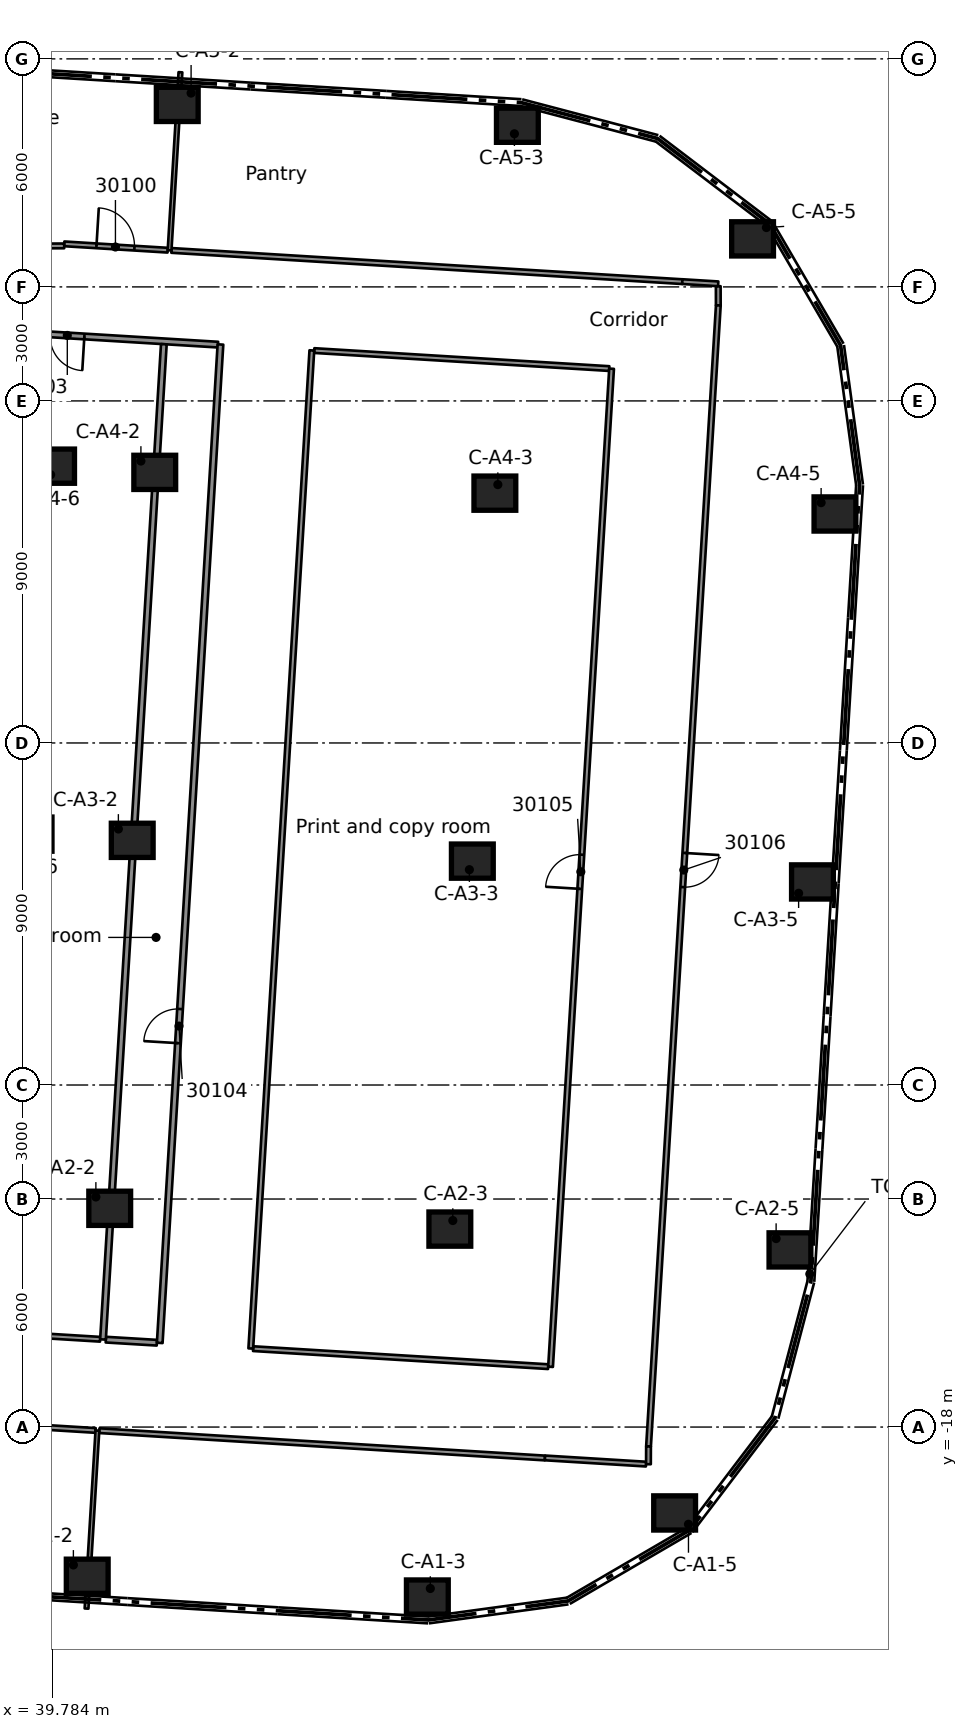
"""IFC4 building model, lengths in metres.
Left out: names, types, materials, properties, quantities, classifications, styles, units other than length and angle.
Written with IfcOpenShell. Run it as: python <this file> out.ifc"""

import sys

from ifc_helpers import new_model, si_unit, direction, frame, frame_2d, origin, origin_2d, place, context, subcontext, project, spatial, rectangle, extrude, element, fill, save


model = new_model("IFC4")
c1 = context("Model", 3, precision=1e-05, world=origin(), true_north=direction((0.0, 1.0)))
c2 = subcontext(c1, "Body", "Model", "MODEL_VIEW")
j1 = project(units=[si_unit("LENGTHUNIT", "METRE"), si_unit("PLANEANGLEUNIT", "RADIAN")], contexts=[c1])
p1 = place(None, origin())
s1 = spatial("IfcSite", under=j1, at=p1, CompositionType="ELEMENT")
p2 = place(p1, origin())
s2 = spatial("IfcBuilding", under=s1, at=p2, CompositionType="ELEMENT")
p3 = place(p2, frame((0.0, 0.0, 152.6)))
s3 = spatial("IfcBuildingStorey", under=s2, at=p3, CompositionType="ELEMENT", Elevation=152.6)
for number, where, z_axis, x_axis in (
    (1, (40.704, -21.926, 0.0), (0.0, 0.0, 1.0), (1.0, 0.0, 0.0)),
    (2, (49.654, -22.473, 0.0), (0.0, 0.0, 1.0), (1.0, 0.0, 0.0)),
    (3, (56.161, -20.26, 0.0), (0.0, 0.0, 1.0), (1.0, 0.0, 0.0)),
    (4, (41.296, -12.244, 0.0), (0.0, 0.0, 1.0), (1.0, 0.0, 0.0)),
    (5, (50.246, -12.791, 0.0), (0.0, 0.0, 1.0), (1.0, 0.0, 0.0)),
    (6, (59.196, -13.339, 0.0), (0.0, 0.0, 1.0), (1.0, 0.0, 0.0)),
    (7, (41.888, -2.562, 0.0), (0.0, 0.0, 1.0), (1.0, 0.0, 0.0)),
    (8, (50.838, -3.109, 0.0), (0.0, 0.0, 1.0), (1.0, 0.0, 0.0)),
    (9, (59.788, -3.657, 0.0), (0.0, 0.0, 1.0), (1.0, 0.0, 0.0)),
    (10, (42.481, 7.12, 0.0), (0.0, 0.0, 1.0), (1.0, 0.0, 0.0)),
    (11, (51.431, 6.573, 0.0), (0.0, 0.0, 1.0), (1.0, 0.0, 0.0)),
    (12, (60.38, 6.025, 0.0), (0.0, 0.0, 1.0), (1.0, 0.0, 0.0)),
    (13, (39.819, 7.283, 0.0), (0.0, 0.0, 1.0), (1.0, 0.0, 0.0)),
    (14, (43.073, 16.802, 0.0), (0.0, 0.0, 1.0), (1.0, 0.0, 0.0)),
    (15, (52.023, 16.254, 0.0), (0.0, 0.0, 1.0), (1.0, 0.0, 0.0)),
    (16, (58.212, 13.264, 0.0), (0.0, 0.0, 1.0), (1.0, 0.0, 0.0)),
):
    element("IfcColumn", number, at=place(p3, frame(where, z_axis=z_axis, x_axis=x_axis)), inside=s3, PredefinedType="COLUMN", context=c2, shape_type="SweptSolid", body=[
        extrude(rectangle(XDim=1.1, YDim=0.9, at=origin_2d()), origin(), (0.0, 0.0, 1.0), 3.5),
    ])
p4 = place(p3, frame((57.309, 12.018, 0.0), z_axis=(0.0, 0.0, 1.0), x_axis=(0.001937042371, -0.999998123932, 0.0)))
e17 = element("IfcWall", 17, at=p4, inside=s3, PredefinedType="PARTITIONING", context=c2, shape_type="SweptSolid", body=[
    extrude(rectangle(XDim=0.504, YDim=0.125, at=frame_2d((0.252, 0.0))), origin(), (0.0, 0.0, 1.0), 3.08),
])
p5 = place(p3, frame((41.022, -18.095, 0.0), z_axis=(0.0, 0.0, 1.0), x_axis=(0.998124844779, -0.06121106301, 0.0)))
e18 = element("IfcWall", 18, at=p5, inside=s3, PredefinedType="PARTITIONING", context=c2, shape_type="SweptSolid", body=[
    extrude(rectangle(XDim=11.746, YDim=0.125, at=frame_2d((5.873, 0.0))), origin(), (0.0, 0.0, 1.0), 3.08),
])
p6 = place(p3, frame((52.75, -18.812, 0.0), z_axis=(0.0, 0.0, 1.0), x_axis=(0.998124296611, -0.061220000931, 0.0)))
e19 = element("IfcWall", 19, at=p6, inside=s3, PredefinedType="PARTITIONING", context=c2, shape_type="SweptSolid", body=[
    extrude(rectangle(XDim=2.664, YDim=0.125, at=frame_2d((1.332, 0.0))), origin(), (0.0, 0.0, 1.0), 3.08),
])
p7 = place(p3, frame((40.923, -18.089, 0.0), z_axis=(0.0, 0.0, 1.0), x_axis=(-0.998135704692, 0.06103372034, 0.0)))
e20 = element("IfcWall", 20, at=p7, inside=s3, PredefinedType="PARTITIONING", context=c2, shape_type="SweptSolid", body=[
    extrude(rectangle(XDim=10.208, YDim=0.125, at=frame_2d((5.104, 0.0))), origin(), (0.0, 0.0, 1.0), 3.08),
])
p8 = place(p7, frame((7.938, 0.0, 0.0)))
e21 = element("IfcOpeningElement", 21, at=p8, cuts=e20, PredefinedType="OPENING", context=c2, shape_type="SweptSolid", body=[
    extrude(rectangle(XDim=0.9, YDim=2.1, at=frame_2d((0.45, 1.05))), frame((0.0, 0.073, 0.0), z_axis=(0.0, -1.0, 0.0), x_axis=(1.0, 0.0, 0.0)), (0.0, 0.0, 1.0), 0.145),
])
p9 = place(p3, frame((41.194, -15.7, 0.0), z_axis=(0.0, 0.0, 1.0), x_axis=(0.998183738246, -0.060243046918, 0.0)))
e22 = element("IfcWall", 22, at=p9, inside=s3, PredefinedType="PARTITIONING", context=c2, shape_type="SweptSolid", body=[
    extrude(rectangle(XDim=1.345, YDim=0.15, at=frame_2d((0.673, 0.0))), origin(), (0.0, 0.0, 1.0), 3.08),
])
p10 = place(p3, frame((31.07, -15.081, 0.0), z_axis=(0.0, 0.0, 1.0), x_axis=(0.998141754277, -0.060934705778, 0.0)))
e23 = element("IfcWall", 23, at=p10, inside=s3, PredefinedType="PARTITIONING", context=c2, shape_type="SweptSolid", body=[
    extrude(rectangle(XDim=9.992, YDim=0.125, at=frame_2d((4.996, 0.0))), origin(), (0.0, 0.0, 1.0), 3.08),
])
p11 = place(p10, frame((2.1, 0.0, 0.0)))
e24 = element("IfcOpeningElement", 24, at=p11, cuts=e23, PredefinedType="OPENING", context=c2, shape_type="SweptSolid", body=[
    extrude(rectangle(XDim=0.9, YDim=2.1, at=frame_2d((0.45, 1.05))), frame((0.0, 0.073, 0.0), z_axis=(0.0, -1.0, 0.0), x_axis=(1.0, 0.0, 0.0)), (0.0, 0.0, 1.0), 0.145),
])
p12 = place(p3, frame((45.07, -15.937, 0.0), z_axis=(0.0, 0.0, 1.0), x_axis=(0.998142502844, -0.060922442628, 0.0)))
e25 = element("IfcWall", 25, at=p12, inside=s3, PredefinedType="PARTITIONING", context=c2, shape_type="SweptSolid", body=[
    extrude(rectangle(XDim=7.778, YDim=0.125, at=frame_2d((3.889, 0.0))), origin(), (0.0, 0.0, 1.0), 3.08),
])
p13 = place(p3, frame((44.145, 10.481, 0.0), z_axis=(0.0, 0.0, 1.0), x_axis=(-0.998138667877, 0.06098524157, 0.0)))
e26 = element("IfcWall", 26, at=p13, inside=s3, PredefinedType="PARTITIONING", context=c2, shape_type="SweptSolid", body=[
    extrude(rectangle(XDim=11.413, YDim=0.15, at=frame_2d((5.707, 0.0))), origin(), (0.0, 0.0, 1.0), 3.08),
])
p14 = place(p13, frame((8.558, 0.0, 0.0)))
e27 = element("IfcOpeningElement", 27, at=p14, cuts=e26, PredefinedType="OPENING", context=c2, shape_type="SweptSolid", body=[
    extrude(rectangle(XDim=0.9, YDim=2.1, at=frame_2d((0.45, 1.05))), frame((0.0, 0.085, 0.0), z_axis=(0.0, -1.0, 0.0), x_axis=(1.0, 0.0, 0.0)), (0.0, 0.0, 1.0), 0.17),
])
p15 = place(p13, frame((3.523, 0.0, 0.0)))
e28 = element("IfcOpeningElement", 28, at=p15, cuts=e26, PredefinedType="OPENING", context=c2, shape_type="SweptSolid", body=[
    extrude(rectangle(XDim=0.9, YDim=2.1, at=frame_2d((0.45, 1.05))), frame((0.0, 0.085, 0.0), z_axis=(0.0, -1.0, 0.0), x_axis=(1.0, 0.0, 0.0)), (0.0, 0.0, 1.0), 0.17),
])
p16 = place(p3, frame((46.677, 10.325, 0.0), z_axis=(0.0, 0.0, 1.0), x_axis=(0.998142036778, -0.060930078101, 0.0)))
e29 = element("IfcWall", 29, at=p16, inside=s3, PredefinedType="PARTITIONING", context=c2, shape_type="SweptSolid", body=[
    extrude(rectangle(XDim=7.777, YDim=0.125, at=frame_2d((3.889, 0.0))), origin(), (0.0, 0.0, 1.0), 3.08),
])
p17 = place(p3, frame((42.921, 12.96, 0.0), z_axis=(0.0, 0.0, 1.0), x_axis=(0.998135679052, -0.061034139647, 0.0)))
e30 = element("IfcWall", 30, at=p17, inside=s3, PredefinedType="PARTITIONING", context=c2, shape_type="SweptSolid", body=[
    extrude(rectangle(XDim=13.468, YDim=0.125, at=frame_2d((6.734, 0.0))), origin(), (0.0, 0.0, 1.0), 3.08),
])
p18 = place(p3, frame((40.099, 13.133, 0.0), z_axis=(0.0, 0.0, 1.0), x_axis=(0.998123336101, -0.061235658973, 0.0)))
e31 = element("IfcWall", 31, at=p18, inside=s3, PredefinedType="PARTITIONING", context=c2, shape_type="SweptSolid", body=[
    extrude(rectangle(XDim=2.727, YDim=0.125, at=frame_2d((1.364, 0.0))), origin(), (0.0, 0.0, 1.0), 3.08),
])
p19 = place(p18, frame((0.85, 0.0, 0.0)))
e32 = element("IfcOpeningElement", 32, at=p19, cuts=e31, PredefinedType="OPENING", context=c2, shape_type="SweptSolid", body=[
    extrude(rectangle(XDim=1.0, YDim=2.1, at=frame_2d((0.5, 1.05))), frame((0.0, 0.073, 0.0), z_axis=(0.0, -1.0, 0.0), x_axis=(1.0, 0.0, 0.0)), (0.0, 0.0, 1.0), 0.145),
])
p20 = place(p3, frame((56.362, 12.139, 0.0), z_axis=(0.0, 0.0, 1.0), x_axis=(0.998134879302, -0.061047217134, 0.0)))
e33 = element("IfcWall", 33, at=p20, inside=s3, PredefinedType="PARTITIONING", context=c2, shape_type="SweptSolid", body=[
    extrude(rectangle(XDim=0.948, YDim=0.125, at=frame_2d((0.474, 0.0))), origin(), (0.0, 0.0, 1.0), 3.08),
])
p21 = place(p3, frame((31.471, 13.041, 0.0), z_axis=(0.0, 0.0, 1.0), x_axis=(0.999990255084, 0.004414718129, 0.0)))
e34 = element("IfcWall", 34, at=p21, inside=s3, PredefinedType="PARTITIONING", context=c2, shape_type="SweptSolid", body=[
    extrude(rectangle(XDim=8.627, YDim=0.125, at=frame_2d((4.313, 0.0))), origin(), (0.0, 0.0, 1.0), 3.08),
])
p22 = place(p3, frame((57.311, 11.514, 0.0), z_axis=(0.0, 0.0, 1.0), x_axis=(-0.061067487699, -0.998133639322, 0.0)))
e35 = element("IfcWall", 35, at=p22, inside=s3, PredefinedType="PARTITIONING", context=c2, shape_type="SweptSolid", body=[
    extrude(rectangle(XDim=30.08, YDim=0.125, at=frame_2d((15.04, 0.0))), origin(), (0.0, 0.0, 1.0), 3.08),
])
p23 = place(p22, frame((14.435, 0.0, 0.0)))
e36 = element("IfcOpeningElement", 36, at=p23, cuts=e35, PredefinedType="OPENING", context=c2, shape_type="SweptSolid", body=[
    extrude(rectangle(XDim=0.9, YDim=2.1, at=frame_2d((0.45, 1.05))), frame((0.0, 0.073, 0.0), z_axis=(0.0, -1.0, 0.0), x_axis=(1.0, 0.0, 0.0)), (0.0, 0.0, 1.0), 0.145),
])
p24 = place(p3, frame((52.896, -16.415, 0.0), z_axis=(0.0, 0.0, 1.0), x_axis=(0.061037428755, 0.998135477924, 0.0)))
e37 = element("IfcWall", 37, at=p24, inside=s3, PredefinedType="PARTITIONING", context=c2, shape_type="SweptSolid", body=[
    extrude(rectangle(XDim=26.311, YDim=0.125, at=frame_2d((13.156, 0.0))), origin(), (0.0, 0.0, 1.0), 3.08),
])
p25 = place(p24, frame((12.6, 0.0, 0.0)))
e38 = element("IfcOpeningElement", 38, at=p25, cuts=e37, PredefinedType="OPENING", context=c2, shape_type="SweptSolid", body=[
    extrude(rectangle(XDim=0.9, YDim=2.1, at=frame_2d((0.45, 1.05))), frame((0.0, 0.073, 0.0), z_axis=(0.0, -1.0, 0.0), x_axis=(1.0, 0.0, 0.0)), (0.0, 0.0, 1.0), 0.145),
])
p26 = place(p3, frame((45.008, -15.933, 0.0), z_axis=(0.0, 0.0, 1.0), x_axis=(0.061073840806, 0.998133250608, 0.0)))
e39 = element("IfcWall", 39, at=p26, inside=s3, PredefinedType="PARTITIONING", context=c2, shape_type="SweptSolid", body=[
    extrude(rectangle(XDim=26.311, YDim=0.125, at=frame_2d((13.156, 0.0))), origin(), (0.0, 0.0, 1.0), 3.08),
])
p27 = place(p3, frame((42.612, -15.786, 0.0), z_axis=(0.0, 0.0, 1.0), x_axis=(0.060711547525, 0.998155352637, 0.0)))
e40 = element("IfcWall", 40, at=p27, inside=s3, PredefinedType="PARTITIONING", context=c2, shape_type="SweptSolid", body=[
    extrude(rectangle(XDim=26.32, YDim=0.15, at=frame_2d((13.16, 0.0))), origin(), (0.0, 0.0, 1.0), 3.08),
])
p28 = place(p27, frame((7.902, 0.0, 0.0)))
e41 = element("IfcOpeningElement", 41, at=p28, cuts=e40, PredefinedType="OPENING", context=c2, shape_type="SweptSolid", body=[
    extrude(rectangle(XDim=0.9, YDim=2.1, at=frame_2d((0.45, 1.05))), frame((0.0, 0.085, 0.0), z_axis=(0.0, -1.0, 0.0), x_axis=(1.0, 0.0, 0.0)), (0.0, 0.0, 1.0), 0.17),
])
p29 = place(p3, frame((40.686, -22.776, 0.0), z_axis=(0.0, 0.0, 1.0), x_axis=(0.060923886766, 0.998142414699, 0.0)))
e42 = element("IfcWall", 42, at=p29, inside=s3, PredefinedType="PARTITIONING", context=c2, shape_type="SweptSolid", body=[
    extrude(rectangle(XDim=4.693, YDim=0.1, at=frame_2d((2.346, 0.0))), origin(), (0.0, 0.0, 1.0), 3.08),
])
p30 = place(p3, frame((41.119, -15.695, 0.0), z_axis=(0.0, 0.0, 1.0), x_axis=(0.061026057913, 0.998136173203, 0.0)))
e43 = element("IfcWall", 43, at=p30, inside=s3, PredefinedType="PARTITIONING", context=c2, shape_type="SweptSolid", body=[
    extrude(rectangle(XDim=26.236, YDim=0.15, at=frame_2d((13.118, 0.0))), origin(), (0.0, 0.0, 1.0), 3.08),
])
p31 = place(p3, frame((42.871, 12.963, 0.0), z_axis=(0.0, 0.0, 1.0), x_axis=(0.0609080718, 0.998143379876, 0.0)))
e44 = element("IfcWall", 44, at=p31, inside=s3, PredefinedType="PARTITIONING", context=c2, shape_type="SweptSolid", body=[
    extrude(rectangle(XDim=4.694, YDim=0.1, at=frame_2d((2.347, 0.0))), origin(), (0.0, 0.0, 1.0), 3.08),
])
p32 = place(p3, frame((55.472, -18.978, 0.0), z_axis=(0.0, 0.0, 1.0), x_axis=(0.004694783941, 0.999988979441, 0.0)))
e45 = element("IfcWall", 45, at=p32, inside=s3, PredefinedType="PARTITIONING", context=c2, shape_type="SweptSolid", body=[
    extrude(rectangle(XDim=0.468, YDim=0.125, at=frame_2d((0.234, 0.0))), origin(), (0.0, 0.0, 1.0), 3.08),
])
p33 = place(p19, origin())
e46 = element("IfcDoor", 46, at=p33, inside=s3, OperationType="SINGLE_SWING_LEFT", PredefinedType="DOOR", context=c2, shape_type="SweptSolid", body=[
    extrude(rectangle(XDim=1.0, YDim=2.1, at=frame_2d((0.5, 1.05))), frame((0.0, 0.025, 0.0), z_axis=(0.0, -1.0, 0.0), x_axis=(1.0, 0.0, 0.0)), (0.0, 0.0, 1.0), 0.05),
])
fill(e32, e46)
p34 = place(p15, origin())
e47 = element("IfcDoor", 47, at=p34, inside=s3, OperationType="SINGLE_SWING_LEFT", PredefinedType="DOOR", context=c2, shape_type="SweptSolid", body=[
    extrude(rectangle(XDim=0.9, YDim=2.1, at=frame_2d((0.45, 1.05))), frame((0.0, 0.025, 0.0), z_axis=(0.0, -1.0, 0.0), x_axis=(1.0, 0.0, 0.0)), (0.0, 0.0, 1.0), 0.05),
])
fill(e28, e47)
p35 = place(p28, origin())
e48 = element("IfcDoor", 48, at=p35, inside=s3, OperationType="SINGLE_SWING_LEFT", PredefinedType="DOOR", context=c2, shape_type="SweptSolid", body=[
    extrude(rectangle(XDim=0.9, YDim=2.1, at=frame_2d((0.45, 1.05))), frame((0.0, 0.025, 0.0), z_axis=(0.0, -1.0, 0.0), x_axis=(1.0, 0.0, 0.0)), (0.0, 0.0, 1.0), 0.05),
])
fill(e41, e48)
p36 = place(p25, origin())
e49 = element("IfcDoor", 49, at=p36, inside=s3, OperationType="SINGLE_SWING_LEFT", PredefinedType="DOOR", context=c2, shape_type="SweptSolid", body=[
    extrude(rectangle(XDim=0.9, YDim=2.1, at=frame_2d((0.45, 1.05))), frame((0.0, 0.025, 0.0), z_axis=(0.0, -1.0, 0.0), x_axis=(1.0, 0.0, 0.0)), (0.0, 0.0, 1.0), 0.05),
])
fill(e38, e49)
p37 = place(p23, origin())
e50 = element("IfcDoor", 50, at=p37, inside=s3, OperationType="SINGLE_SWING_LEFT", PredefinedType="DOOR", context=c2, shape_type="SweptSolid", body=[
    extrude(rectangle(XDim=0.9, YDim=2.1, at=frame_2d((0.45, 1.05))), frame((0.0, 0.025, 0.0), z_axis=(0.0, -1.0, 0.0), x_axis=(1.0, 0.0, 0.0)), (0.0, 0.0, 1.0), 0.05),
])
fill(e36, e50)
save(model, sys.argv[1])
